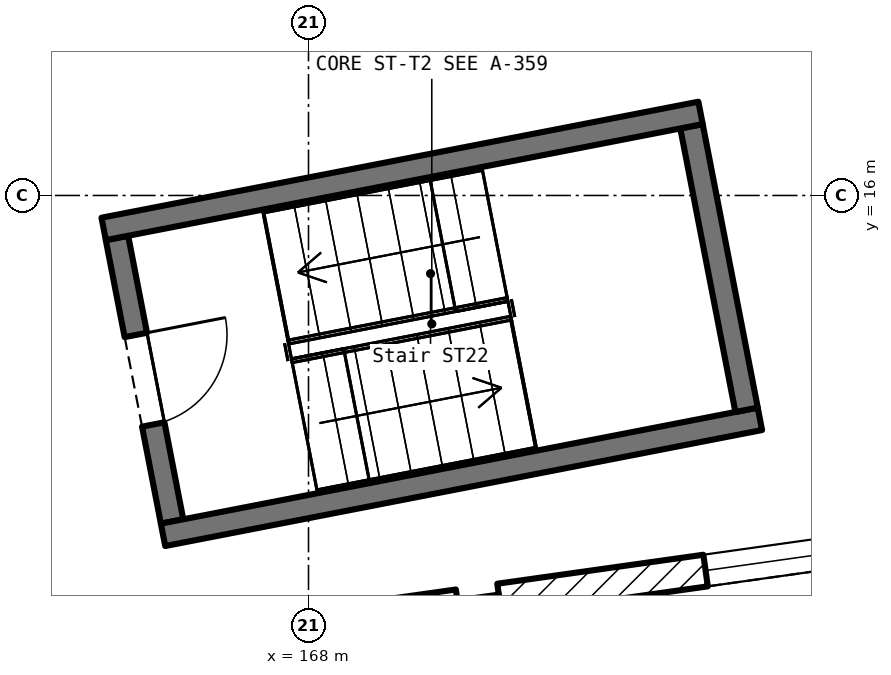
"""IFC4 building model, lengths in metres.
Left out: names, types, materials, properties, quantities, classifications, styles, units other than length and angle.
Written with IfcOpenShell. Run it as: python <this file> out.ifc"""

import sys

from ifc_helpers import new_model, si_unit, direction, frame, frame_2d, origin, origin_2d, place, context, subcontext, project, spatial, rectangle, extrude, element, fill, save


model = new_model("IFC4")
c1 = context("Model", 3, precision=1e-05, world=origin(), true_north=direction((0.0, 1.0)))
c2 = subcontext(c1, "Body", "Model", "MODEL_VIEW")
j1 = project(units=[si_unit("LENGTHUNIT", "METRE"), si_unit("PLANEANGLEUNIT", "RADIAN")], contexts=[c1])
p1 = place(None, origin())
s1 = spatial("IfcSite", under=j1, at=p1, CompositionType="ELEMENT")
p2 = place(p1, origin())
s2 = spatial("IfcBuilding", under=s1, at=p2, CompositionType="ELEMENT")
p3 = place(p2, frame((0.0, 0.0, 11.5)))
s3 = spatial("IfcBuildingStorey", under=s2, at=p3, CompositionType="ELEMENT", Elevation=11.5)
p4 = place(p3, frame((170.27, 10.438, 0.0), z_axis=(0.0, 0.0, 1.0), x_axis=(0.13917310096, -0.990268068742, 0.0)))
e1 = element("IfcColumn", 1, at=p4, inside=s3, PredefinedType="COLUMN", context=c2, shape_type="SweptSolid", body=[
    extrude(rectangle(XDim=0.55, YDim=0.55, at=origin_2d()), origin(), (0.0, 0.0, 1.0), 5.5),
])
p5 = place(p3, frame((168.89, 10.456, 0.0), z_axis=(0.0, 0.0, 1.0), x_axis=(0.990225632743, 0.139474715481, 0.0)))
e2 = element("IfcWall", 2, at=p5, inside=s3, PredefinedType="SOLIDWALL", context=c2, shape_type="SweptSolid", body=[
    extrude(rectangle(XDim=1.089, YDim=0.42, at=frame_2d((0.544, 0.0))), origin(), (0.0, 0.0, 1.0), 4.4),
])
p6 = place(p3, frame((170.513, 10.684, 0.0), z_axis=(0.0, 0.0, 1.0), x_axis=(0.990259181758, 0.139236320493, 0.0)))
e3 = element("IfcWall", 3, at=p6, inside=s3, PredefinedType="SOLIDWALL", context=c2, shape_type="SweptSolid", body=[
    extrude(rectangle(XDim=7.275, YDim=0.42, at=frame_2d((3.637, 0.0))), origin(), (0.0, 0.0, 1.0), 5.2),
])
p7 = place(p6, frame((2.738, 0.0, 1.0)))
e4 = element("IfcOpeningElement", 4, at=p7, cuts=e3, PredefinedType="OPENING", context=c2, shape_type="SweptSolid", body=[
    extrude(rectangle(XDim=1.8, YDim=1.5, at=frame_2d((0.9, 0.75))), frame((0.0, 0.222, 0.0), z_axis=(0.0, -1.0, 0.0), x_axis=(1.0, 0.0, 0.0)), (0.0, 0.0, 1.0), 0.444),
])
p8 = place(p3, frame((165.48, 15.441, 0.0), z_axis=(0.0, 0.0, 1.0), x_axis=(0.190824946063, -0.981624082814, 0.0)))
e5 = element("IfcWall", 5, at=p8, inside=s3, PredefinedType="SOLIDWALL", context=c2, shape_type="SweptSolid", body=[
    extrude(rectangle(XDim=3.8, YDim=0.3, at=frame_2d((1.9, 0.0))), origin(), (0.0, 0.0, 1.0), 5.5),
])
p9 = place(p8, frame((1.3, 0.0, 0.0)))
e6 = element("IfcOpeningElement", 6, at=p9, cuts=e5, PredefinedType="OPENING", context=c2, shape_type="SweptSolid", body=[
    extrude(rectangle(XDim=1.2, YDim=2.1, at=frame_2d((0.6, 1.05))), frame((0.0, 0.162, 0.0), z_axis=(0.0, -1.0, 0.0), x_axis=(1.0, 0.0, 0.0)), (0.0, 0.0, 1.0), 0.324),
])
p10 = place(p3, frame((166.086, 11.535, 0.0), z_axis=(0.0, 0.0, 1.0), x_axis=(0.981635396686, 0.190766737073, 0.0)))
e7 = element("IfcWall", 7, at=p10, inside=s3, PredefinedType="SOLIDWALL", context=c2, shape_type="SweptSolid", body=[
    extrude(rectangle(XDim=8.0, YDim=0.3, at=frame_2d((4.0, 0.0))), origin(), (0.0, 0.0, 1.0), 5.5),
])
p11 = place(p3, frame((173.764, 13.18, 0.0), z_axis=(0.0, 0.0, 1.0), x_axis=(-0.190763033741, 0.981636116368, 0.0)))
e8 = element("IfcWall", 8, at=p11, inside=s3, PredefinedType="SOLIDWALL", context=c2, shape_type="SweptSolid", body=[
    extrude(rectangle(XDim=3.8, YDim=0.3, at=frame_2d((1.9, 0.0))), origin(), (0.0, 0.0, 1.0), 5.5),
])
p12 = place(p3, frame((173.158, 17.086, 0.0), z_axis=(0.0, 0.0, 1.0), x_axis=(-0.981641111144, -0.190737329623, 0.0)))
e9 = element("IfcWall", 9, at=p12, inside=s3, PredefinedType="SOLIDWALL", context=c2, shape_type="SweptSolid", body=[
    extrude(rectangle(XDim=8.0, YDim=0.3, at=frame_2d((4.0, 0.0))), origin(), (0.0, 0.0, 1.0), 5.5),
])
p13 = place(p7, origin())
e10 = element("IfcWindow", 10, at=p13, inside=s3, PartitioningType="DOUBLE_PANEL_VERTICAL", PredefinedType="WINDOW", context=c2, shape_type="SweptSolid", body=[
    extrude(rectangle(XDim=1.8, YDim=1.5, at=frame_2d((0.9, 0.75))), frame((0.0, 0.03, 0.0), z_axis=(0.0, -1.0, 0.0), x_axis=(1.0, 0.0, 0.0)), (0.0, 0.0, 1.0), 0.06),
])
fill(e4, e10)
p14 = place(p9, origin())
e11 = element("IfcDoor", 11, at=p14, inside=s3, OperationType="SINGLE_SWING_LEFT", PredefinedType="DOOR", context=c2, shape_type="SweptSolid", body=[
    extrude(rectangle(XDim=1.2, YDim=2.1, at=frame_2d((0.6, 1.05))), frame((0.0, 0.025, 0.0), z_axis=(0.0, -1.0, 0.0), x_axis=(1.0, 0.0, 0.0)), (0.0, 0.0, 1.0), 0.05),
])
fill(e6, e11)
save(model, sys.argv[1])
